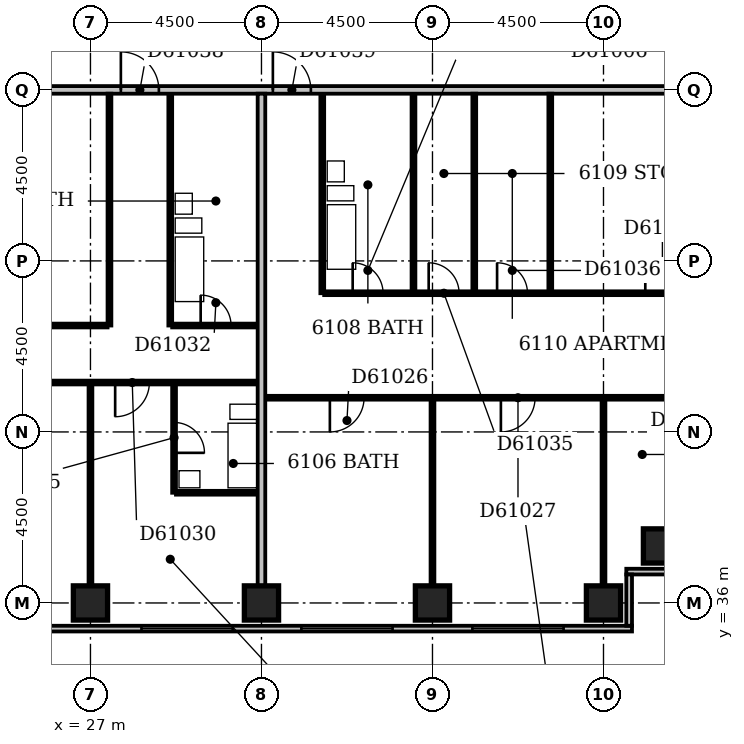
"""IFC4 building model, lengths in metres.
Left out: names, types, materials, properties, quantities, classifications, styles, units other than length and angle.
Written with IfcOpenShell. Run it as: python <this file> out.ifc"""

import sys

from ifc_helpers import new_model, si_unit, direction, frame, frame_2d, origin, origin_2d, place, context, subcontext, project, spatial, rectangle, extrude, element, fill, save


model = new_model("IFC4")
c1 = context("Model", 3, precision=1e-05, world=origin(), true_north=direction((0.0, 1.0)))
c2 = subcontext(c1, "Body", "Model", "MODEL_VIEW")
j1 = project(units=[si_unit("LENGTHUNIT", "METRE"), si_unit("PLANEANGLEUNIT", "RADIAN")], contexts=[c1])
p1 = place(None, origin())
s1 = spatial("IfcSite", under=j1, at=p1, CompositionType="ELEMENT")
p2 = place(p1, origin())
s2 = spatial("IfcBuilding", under=s1, at=p2, CompositionType="ELEMENT")
p3 = place(p2, frame((0.0, 0.0, 236.6)))
s3 = spatial("IfcBuildingStorey", under=s2, at=p3, CompositionType="ELEMENT", Elevation=236.6)
for number, where, z_axis, x_axis in (
    (1, (27.0, 36.0, -0.3), (0.0, 0.0, 1.0), (1.0, 0.0, 0.0)),
    (2, (31.5, 36.0, -0.3), (0.0, 0.0, 1.0), (1.0, 0.0, 0.0)),
    (3, (36.0, 36.0, -0.3), (0.0, 0.0, 1.0), (1.0, 0.0, 0.0)),
    (4, (40.5, 36.0, -0.3), (0.0, 0.0, 1.0), (1.0, 0.0, 0.0)),
    (5, (42.0, 37.5, -0.3), (0.0, 0.0, 1.0), (1.0, 0.0, 0.0)),
):
    element("IfcColumn", number, at=place(p3, frame(where, z_axis=z_axis, x_axis=x_axis)), inside=s3, PredefinedType="COLUMN", context=c2, shape_type="SweptSolid", body=[
        extrude(rectangle(XDim=0.9, YDim=0.9, at=origin_2d()), origin(), (0.0, 0.0, 1.0), 3.6),
    ])
p4 = place(p3, frame((23.1, 35.325, 0.0), z_axis=(0.0, 0.0, 1.0), x_axis=(1.0, 0.0, 0.0)))
e6 = element("IfcWall", 6, at=p4, inside=s3, PredefinedType="STANDARD", context=c2, shape_type="SweptSolid", body=[
    extrude(rectangle(XDim=18.15, YDim=0.15, at=frame_2d((9.075, 0.0))), origin(), (0.0, 0.0, 1.0), 2.7),
])
p5 = place(p4, frame((0.45, 0.0, 0.6)))
e7 = element("IfcOpeningElement", 7, at=p5, cuts=e6, PredefinedType="OPENING", context=c2, shape_type="SweptSolid", body=[
    extrude(rectangle(XDim=2.4, YDim=1.8, at=frame_2d((1.2, 0.9))), frame((0.0, 0.087, 0.0), z_axis=(0.0, -1.0, 0.0), x_axis=(1.0, 0.0, 0.0)), (0.0, 0.0, 1.0), 0.174),
])
p6 = place(p4, frame((5.242, 0.0, 0.6)))
e8 = element("IfcOpeningElement", 8, at=p6, cuts=e6, PredefinedType="OPENING", context=c2, shape_type="SweptSolid", body=[
    extrude(rectangle(XDim=2.4, YDim=1.8, at=frame_2d((1.2, 0.9))), frame((0.0, 0.087, 0.0), z_axis=(0.0, -1.0, 0.0), x_axis=(1.0, 0.0, 0.0)), (0.0, 0.0, 1.0), 0.174),
])
p7 = place(p4, frame((9.45, 0.0, 0.6)))
e9 = element("IfcOpeningElement", 9, at=p7, cuts=e6, PredefinedType="OPENING", context=c2, shape_type="SweptSolid", body=[
    extrude(rectangle(XDim=2.4, YDim=1.8, at=frame_2d((1.2, 0.9))), frame((0.0, 0.087, 0.0), z_axis=(0.0, -1.0, 0.0), x_axis=(1.0, 0.0, 0.0)), (0.0, 0.0, 1.0), 0.174),
])
p8 = place(p4, frame((13.95, 0.0, 0.6)))
e10 = element("IfcOpeningElement", 10, at=p8, cuts=e6, PredefinedType="OPENING", context=c2, shape_type="SweptSolid", body=[
    extrude(rectangle(XDim=2.4, YDim=1.8, at=frame_2d((1.2, 0.9))), frame((0.0, 0.087, 0.0), z_axis=(0.0, -1.0, 0.0), x_axis=(1.0, 0.0, 0.0)), (0.0, 0.0, 1.0), 0.174),
])
p9 = place(p3, frame((41.175, 35.4, 0.0), z_axis=(0.0, 0.0, 1.0), x_axis=(0.0, 1.0, 0.0)))
e11 = element("IfcWall", 11, at=p9, inside=s3, PredefinedType="STANDARD", context=c2, shape_type="SweptSolid", body=[
    extrude(rectangle(XDim=1.35, YDim=0.15, at=frame_2d((0.675, 0.0))), origin(), (0.0, 0.0, 1.0), 2.7),
])
p10 = place(p3, frame((41.1, 36.825, 0.0), z_axis=(0.0, 0.0, 1.0), x_axis=(1.0, 0.0, 0.0)))
e12 = element("IfcWall", 12, at=p10, inside=s3, PredefinedType="STANDARD", context=c2, shape_type="SweptSolid", body=[
    extrude(rectangle(XDim=1.65, YDim=0.15, at=frame_2d((0.825, 0.0))), origin(), (0.0, 0.0, 1.0), 2.7),
])
p11 = place(p3, frame((27.0, 36.45, 0.0), z_axis=(0.0, 0.0, 1.0), x_axis=(0.0, 1.0, 0.0)))
e13 = element("IfcWall", 13, at=p11, inside=s3, PredefinedType="PARTITIONING", context=c2, shape_type="SweptSolid", body=[
    extrude(rectangle(XDim=5.3, YDim=0.1, at=frame_2d((2.65, 0.0))), origin(), (0.0, 0.0, 1.0), 3.3),
])
p12 = place(p3, frame((31.5, 36.45, 0.0), z_axis=(0.0, 0.0, 1.0), x_axis=(0.0, 1.0, 0.0)))
e14 = element("IfcWall", 14, at=p12, inside=s3, PredefinedType="PARTITIONING", context=c2, shape_type="SweptSolid", body=[
    extrude(rectangle(XDim=12.95, YDim=0.2, at=frame_2d((6.475, 0.0))), origin(), (0.0, 0.0, 1.0), 3.3),
])
for number, where, z_axis, x_axis in (
    (15, (36.0, 36.45, 0.0), (0.0, 0.0, 1.0), (0.0, 1.0, 0.0)),
    (16, (40.5, 36.45, 0.0), (0.0, 0.0, 1.0), (0.0, 1.0, 0.0)),
):
    element("IfcWall", number, at=place(p3, frame(where, z_axis=z_axis, x_axis=x_axis)), inside=s3, PredefinedType="PARTITIONING", context=c2, shape_type="SweptSolid", body=[
        extrude(rectangle(XDim=4.9, YDim=0.1, at=frame_2d((2.45, 0.0))), origin(), (0.0, 0.0, 1.0), 3.3),
    ])
p13 = place(p3, frame((29.2, 38.9, 0.0), z_axis=(0.0, 0.0, 1.0), x_axis=(0.0, 1.0, 0.0)))
e17 = element("IfcWall", 17, at=p13, inside=s3, PredefinedType="PLUMBINGWALL", context=c2, shape_type="SweptSolid", body=[
    extrude(rectangle(XDim=2.85, YDim=0.1, at=frame_2d((1.425, 0.0))), origin(), (0.0, 0.0, 1.0), 3.3),
])
p14 = place(p13, frame((1.05, 0.0, 0.0)))
e18 = element("IfcOpeningElement", 18, at=p14, cuts=e17, PredefinedType="OPENING", context=c2, shape_type="SweptSolid", body=[
    extrude(rectangle(XDim=0.8, YDim=2.1, at=frame_2d((0.4, 1.05))), frame((0.0, 0.062, 0.0), z_axis=(0.0, -1.0, 0.0), x_axis=(1.0, 0.0, 0.0)), (0.0, 0.0, 1.0), 0.124),
])
p15 = place(p3, frame((29.25, 38.9, 0.0), z_axis=(0.0, 0.0, 1.0), x_axis=(1.0, 0.0, 0.0)))
e19 = element("IfcWall", 19, at=p15, inside=s3, PredefinedType="PLUMBINGWALL", context=c2, shape_type="SweptSolid", body=[
    extrude(rectangle(XDim=2.15, YDim=0.1, at=frame_2d((1.075, 0.0))), origin(), (0.0, 0.0, 1.0), 3.3),
])
p16 = place(p3, frame((31.6, 41.4, 0.0), z_axis=(0.0, 0.0, 1.0), x_axis=(1.0, 0.0, 0.0)))
e20 = element("IfcWall", 20, at=p16, inside=s3, PredefinedType="PARTITIONING", context=c2, shape_type="SweptSolid", body=[
    extrude(rectangle(XDim=14.0, YDim=0.1, at=frame_2d((7.0, 0.0))), origin(), (0.0, 0.0, 1.0), 3.3),
])
p17 = place(p16, frame((1.7, 0.0, 0.0)))
e21 = element("IfcOpeningElement", 21, at=p17, cuts=e20, PredefinedType="OPENING", context=c2, shape_type="SweptSolid", body=[
    extrude(rectangle(XDim=0.9, YDim=2.1, at=frame_2d((0.45, 1.05))), frame((0.0, 0.062, 0.0), z_axis=(0.0, -1.0, 0.0), x_axis=(1.0, 0.0, 0.0)), (0.0, 0.0, 1.0), 0.124),
])
p18 = place(p16, frame((6.2, 0.0, 0.0)))
e22 = element("IfcOpeningElement", 22, at=p18, cuts=e20, PredefinedType="OPENING", context=c2, shape_type="SweptSolid", body=[
    extrude(rectangle(XDim=0.9, YDim=2.1, at=frame_2d((0.45, 1.05))), frame((0.0, 0.062, 0.0), z_axis=(0.0, -1.0, 0.0), x_axis=(1.0, 0.0, 0.0)), (0.0, 0.0, 1.0), 0.124),
])
p19 = place(p16, frame((10.7, 0.0, 0.0)))
e23 = element("IfcOpeningElement", 23, at=p19, cuts=e20, PredefinedType="OPENING", context=c2, shape_type="SweptSolid", body=[
    extrude(rectangle(XDim=0.9, YDim=2.1, at=frame_2d((0.45, 1.05))), frame((0.0, 0.062, 0.0), z_axis=(0.0, -1.0, 0.0), x_axis=(1.0, 0.0, 0.0)), (0.0, 0.0, 1.0), 0.124),
])
p20 = place(p3, frame((22.6, 41.8, 0.0), z_axis=(0.0, 0.0, 1.0), x_axis=(1.0, 0.0, 0.0)))
e24 = element("IfcWall", 24, at=p20, inside=s3, PredefinedType="PARTITIONING", context=c2, shape_type="SweptSolid", body=[
    extrude(rectangle(XDim=8.8, YDim=0.1, at=frame_2d((4.4, 0.0))), origin(), (0.0, 0.0, 1.0), 3.3),
])
p21 = place(p20, frame((1.7, 0.0, 0.0)))
e25 = element("IfcOpeningElement", 25, at=p21, cuts=e24, PredefinedType="OPENING", context=c2, shape_type="SweptSolid", body=[
    extrude(rectangle(XDim=0.9, YDim=2.1, at=frame_2d((0.45, 1.05))), frame((0.0, 0.062, 0.0), z_axis=(0.0, -1.0, 0.0), x_axis=(1.0, 0.0, 0.0)), (0.0, 0.0, 1.0), 0.124),
])
p22 = place(p20, frame((5.05, 0.0, 0.0)))
e26 = element("IfcOpeningElement", 26, at=p22, cuts=e24, PredefinedType="OPENING", context=c2, shape_type="SweptSolid", body=[
    extrude(rectangle(XDim=0.9, YDim=2.1, at=frame_2d((0.45, 1.05))), frame((0.0, 0.062, 0.0), z_axis=(0.0, -1.0, 0.0), x_axis=(1.0, 0.0, 0.0)), (0.0, 0.0, 1.0), 0.124),
])
p23 = place(p3, frame((22.6, 43.3, 0.0), z_axis=(0.0, 0.0, 1.0), x_axis=(1.0, 0.0, 0.0)))
e27 = element("IfcWall", 27, at=p23, inside=s3, PredefinedType="PARTITIONING", context=c2, shape_type="SweptSolid", body=[
    extrude(rectangle(XDim=4.85, YDim=0.1, at=frame_2d((2.425, 0.0))), origin(), (0.0, 0.0, 1.0), 3.3),
])
p24 = place(p23, frame((1.95, 0.0, 0.0)))
e28 = element("IfcOpeningElement", 28, at=p24, cuts=e27, PredefinedType="OPENING", context=c2, shape_type="SweptSolid", body=[
    extrude(rectangle(XDim=0.9, YDim=2.1, at=frame_2d((0.45, 1.05))), frame((0.0, 0.062, 0.0), z_axis=(0.0, -1.0, 0.0), x_axis=(1.0, 0.0, 0.0)), (0.0, 0.0, 1.0), 0.124),
])
p25 = place(p3, frame((27.5, 43.3, 0.0), z_axis=(0.0, 0.0, 1.0), x_axis=(0.0, 1.0, 0.0)))
e29 = element("IfcWall", 29, at=p25, inside=s3, PredefinedType="PARTITIONING", context=c2, shape_type="SweptSolid", body=[
    extrude(rectangle(XDim=6.1, YDim=0.1, at=frame_2d((3.05, 0.0))), origin(), (0.0, 0.0, 1.0), 3.3),
])
p26 = place(p3, frame((29.1, 43.3, 0.0), z_axis=(0.0, 0.0, 1.0), x_axis=(0.0, 1.0, 0.0)))
e30 = element("IfcWall", 30, at=p26, inside=s3, PredefinedType="PLUMBINGWALL", context=c2, shape_type="SweptSolid", body=[
    extrude(rectangle(XDim=6.1, YDim=0.1, at=frame_2d((3.05, 0.0))), origin(), (0.0, 0.0, 1.0), 3.3),
])
p27 = place(p3, frame((29.15, 43.3, 0.0), z_axis=(0.0, 0.0, 1.0), x_axis=(1.0, 0.0, 0.0)))
e31 = element("IfcWall", 31, at=p27, inside=s3, PredefinedType="PARTITIONING", context=c2, shape_type="SweptSolid", body=[
    extrude(rectangle(XDim=2.25, YDim=0.1, at=frame_2d((1.125, 0.0))), origin(), (0.0, 0.0, 1.0), 3.3),
])
p28 = place(p27, frame((0.75, 0.0, 0.0)))
e32 = element("IfcOpeningElement", 32, at=p28, cuts=e31, PredefinedType="OPENING", context=c2, shape_type="SweptSolid", body=[
    extrude(rectangle(XDim=0.8, YDim=2.1, at=frame_2d((0.4, 1.05))), frame((0.0, 0.062, 0.0), z_axis=(0.0, -1.0, 0.0), x_axis=(1.0, 0.0, 0.0)), (0.0, 0.0, 1.0), 0.124),
])
p29 = place(p3, frame((33.1, 44.15, 0.0), z_axis=(0.0, 0.0, 1.0), x_axis=(0.0, 1.0, 0.0)))
e33 = element("IfcWall", 33, at=p29, inside=s3, PredefinedType="PLUMBINGWALL", context=c2, shape_type="SweptSolid", body=[
    extrude(rectangle(XDim=5.25, YDim=0.1, at=frame_2d((2.625, 0.0))), origin(), (0.0, 0.0, 1.0), 3.3),
])
p30 = place(p3, frame((33.15, 44.15, 0.0), z_axis=(0.0, 0.0, 1.0), x_axis=(1.0, 0.0, 0.0)))
e34 = element("IfcWall", 34, at=p30, inside=s3, PredefinedType="PARTITIONING", context=c2, shape_type="SweptSolid", body=[
    extrude(rectangle(XDim=12.45, YDim=0.1, at=frame_2d((6.225, 0.0))), origin(), (0.0, 0.0, 1.0), 3.3),
])
p31 = place(p30, frame((0.75, 0.0, 0.0)))
e35 = element("IfcOpeningElement", 35, at=p31, cuts=e34, PredefinedType="OPENING", context=c2, shape_type="SweptSolid", body=[
    extrude(rectangle(XDim=0.8, YDim=2.1, at=frame_2d((0.4, 1.05))), frame((0.0, 0.062, 0.0), z_axis=(0.0, -1.0, 0.0), x_axis=(1.0, 0.0, 0.0)), (0.0, 0.0, 1.0), 0.124),
])
p32 = place(p30, frame((8.45, 0.0, 0.0)))
e36 = element("IfcOpeningElement", 36, at=p32, cuts=e34, PredefinedType="OPENING", context=c2, shape_type="SweptSolid", body=[
    extrude(rectangle(XDim=0.9, YDim=2.1, at=frame_2d((0.45, 1.05))), frame((0.0, 0.062, 0.0), z_axis=(0.0, -1.0, 0.0), x_axis=(1.0, 0.0, 0.0)), (0.0, 0.0, 1.0), 0.124),
])
p33 = place(p30, frame((2.75, 0.0, 0.0)))
e37 = element("IfcOpeningElement", 37, at=p33, cuts=e34, PredefinedType="OPENING", context=c2, shape_type="SweptSolid", body=[
    extrude(rectangle(XDim=0.8, YDim=2.1, at=frame_2d((0.4, 1.05))), frame((0.0, 0.062, 0.0), z_axis=(0.0, -1.0, 0.0), x_axis=(1.0, 0.0, 0.0)), (0.0, 0.0, 1.0), 0.124),
])
p34 = place(p30, frame((4.55, 0.0, 0.0)))
e38 = element("IfcOpeningElement", 38, at=p34, cuts=e34, PredefinedType="OPENING", context=c2, shape_type="SweptSolid", body=[
    extrude(rectangle(XDim=0.8, YDim=2.1, at=frame_2d((0.4, 1.05))), frame((0.0, 0.062, 0.0), z_axis=(0.0, -1.0, 0.0), x_axis=(1.0, 0.0, 0.0)), (0.0, 0.0, 1.0), 0.124),
])
p35 = place(p3, frame((35.5, 44.2, 0.0), z_axis=(0.0, 0.0, 1.0), x_axis=(0.0, 1.0, 0.0)))
e39 = element("IfcWall", 39, at=p35, inside=s3, PredefinedType="PLUMBINGWALL", context=c2, shape_type="SweptSolid", body=[
    extrude(rectangle(XDim=5.2, YDim=0.1, at=frame_2d((2.6, 0.0))), origin(), (0.0, 0.0, 1.0), 3.3),
])
for number, where, z_axis, x_axis in (
    (40, (37.1, 44.2, 0.0), (0.0, 0.0, 1.0), (0.0, 1.0, 0.0)),
    (41, (39.1, 44.2, 0.0), (0.0, 0.0, 1.0), (0.0, 1.0, 0.0)),
):
    element("IfcWall", number, at=place(p3, frame(where, z_axis=z_axis, x_axis=x_axis)), inside=s3, PredefinedType="PARTITIONING", context=c2, shape_type="SweptSolid", body=[
        extrude(rectangle(XDim=5.2, YDim=0.1, at=frame_2d((2.6, 0.0))), origin(), (0.0, 0.0, 1.0), 3.3),
    ])
p36 = place(p3, frame((22.6, 49.5, 0.0), z_axis=(0.0, 0.0, 1.0), x_axis=(1.0, 0.0, 0.0)))
e42 = element("IfcWall", 42, at=p36, inside=s3, PredefinedType="PARTITIONING", context=c2, shape_type="SweptSolid", body=[
    extrude(rectangle(XDim=21.95, YDim=0.2, at=frame_2d((10.975, 0.0))), origin(), (0.0, 0.0, 1.0), 3.3),
])
p37 = place(p36, frame((5.2, 0.0, 0.0)))
e43 = element("IfcOpeningElement", 43, at=p37, cuts=e42, PredefinedType="OPENING", context=c2, shape_type="SweptSolid", body=[
    extrude(rectangle(XDim=1.0, YDim=2.1, at=frame_2d((0.5, 1.05))), frame((0.0, 0.112, 0.0), z_axis=(0.0, -1.0, 0.0), x_axis=(1.0, 0.0, 0.0)), (0.0, 0.0, 1.0), 0.224),
])
p38 = place(p36, frame((9.2, 0.0, 0.0)))
e44 = element("IfcOpeningElement", 44, at=p38, cuts=e42, PredefinedType="OPENING", context=c2, shape_type="SweptSolid", body=[
    extrude(rectangle(XDim=1.0, YDim=2.1, at=frame_2d((0.5, 1.05))), frame((0.0, 0.112, 0.0), z_axis=(0.0, -1.0, 0.0), x_axis=(1.0, 0.0, 0.0)), (0.0, 0.0, 1.0), 0.224),
])
p39 = place(p6, origin())
e45 = element("IfcWindow", 45, at=p39, inside=s3, PartitioningType="SINGLE_PANEL", PredefinedType="WINDOW", context=c2, shape_type="SweptSolid", body=[
    extrude(rectangle(XDim=2.4, YDim=1.8, at=frame_2d((1.2, 0.9))), frame((0.0, 0.03, 0.0), z_axis=(0.0, -1.0, 0.0), x_axis=(1.0, 0.0, 0.0)), (0.0, 0.0, 1.0), 0.06),
])
fill(e8, e45)
p40 = place(p7, origin())
e46 = element("IfcWindow", 46, at=p40, inside=s3, PartitioningType="SINGLE_PANEL", PredefinedType="WINDOW", context=c2, shape_type="SweptSolid", body=[
    extrude(rectangle(XDim=2.4, YDim=1.8, at=frame_2d((1.2, 0.9))), frame((0.0, 0.03, 0.0), z_axis=(0.0, -1.0, 0.0), x_axis=(1.0, 0.0, 0.0)), (0.0, 0.0, 1.0), 0.06),
])
fill(e9, e46)
p41 = place(p8, origin())
e47 = element("IfcWindow", 47, at=p41, inside=s3, PartitioningType="SINGLE_PANEL", PredefinedType="WINDOW", context=c2, shape_type="SweptSolid", body=[
    extrude(rectangle(XDim=2.4, YDim=1.8, at=frame_2d((1.2, 0.9))), frame((0.0, 0.03, 0.0), z_axis=(0.0, -1.0, 0.0), x_axis=(1.0, 0.0, 0.0)), (0.0, 0.0, 1.0), 0.06),
])
fill(e10, e47)
p42 = place(p14, frame((0.8, 0.0, 0.0), z_axis=(0.0, 0.0, 1.0), x_axis=(-1.0, 0.0, 0.0)))
e48 = element("IfcDoor", 48, at=p42, inside=s3, OperationType="SINGLE_SWING_RIGHT", PredefinedType="DOOR", context=c2, shape_type="SweptSolid", body=[
    extrude(rectangle(XDim=0.8, YDim=2.1, at=frame_2d((0.4, 1.05))), frame((0.0, 0.025, 0.0), z_axis=(0.0, -1.0, 0.0), x_axis=(1.0, 0.0, 0.0)), (0.0, 0.0, 1.0), 0.05),
])
fill(e18, e48)
p43 = place(p17, frame((0.9, 0.0, 0.0), z_axis=(0.0, 0.0, 1.0), x_axis=(-1.0, 0.0, 0.0)))
e49 = element("IfcDoor", 49, at=p43, inside=s3, OperationType="SINGLE_SWING_RIGHT", PredefinedType="DOOR", context=c2, shape_type="SweptSolid", body=[
    extrude(rectangle(XDim=0.9, YDim=2.1, at=frame_2d((0.45, 1.05))), frame((0.0, 0.025, 0.0), z_axis=(0.0, -1.0, 0.0), x_axis=(1.0, 0.0, 0.0)), (0.0, 0.0, 1.0), 0.05),
])
fill(e21, e49)
p44 = place(p18, frame((0.9, 0.0, 0.0), z_axis=(0.0, 0.0, 1.0), x_axis=(-1.0, 0.0, 0.0)))
e50 = element("IfcDoor", 50, at=p44, inside=s3, OperationType="SINGLE_SWING_RIGHT", PredefinedType="DOOR", context=c2, shape_type="SweptSolid", body=[
    extrude(rectangle(XDim=0.9, YDim=2.1, at=frame_2d((0.45, 1.05))), frame((0.0, 0.025, 0.0), z_axis=(0.0, -1.0, 0.0), x_axis=(1.0, 0.0, 0.0)), (0.0, 0.0, 1.0), 0.05),
])
fill(e22, e50)
p45 = place(p22, frame((0.9, 0.0, 0.0), z_axis=(0.0, 0.0, 1.0), x_axis=(-1.0, 0.0, 0.0)))
e51 = element("IfcDoor", 51, at=p45, inside=s3, OperationType="SINGLE_SWING_RIGHT", PredefinedType="DOOR", context=c2, shape_type="SweptSolid", body=[
    extrude(rectangle(XDim=0.9, YDim=2.1, at=frame_2d((0.45, 1.05))), frame((0.0, 0.025, 0.0), z_axis=(0.0, -1.0, 0.0), x_axis=(1.0, 0.0, 0.0)), (0.0, 0.0, 1.0), 0.05),
])
fill(e26, e51)
p46 = place(p28, origin())
e52 = element("IfcDoor", 52, at=p46, inside=s3, OperationType="SINGLE_SWING_LEFT", PredefinedType="DOOR", context=c2, shape_type="SweptSolid", body=[
    extrude(rectangle(XDim=0.8, YDim=2.1, at=frame_2d((0.4, 1.05))), frame((0.0, 0.025, 0.0), z_axis=(0.0, -1.0, 0.0), x_axis=(1.0, 0.0, 0.0)), (0.0, 0.0, 1.0), 0.05),
])
fill(e32, e52)
p47 = place(p31, origin())
e53 = element("IfcDoor", 53, at=p47, inside=s3, OperationType="SINGLE_SWING_LEFT", PredefinedType="DOOR", context=c2, shape_type="SweptSolid", body=[
    extrude(rectangle(XDim=0.8, YDim=2.1, at=frame_2d((0.4, 1.05))), frame((0.0, 0.025, 0.0), z_axis=(0.0, -1.0, 0.0), x_axis=(1.0, 0.0, 0.0)), (0.0, 0.0, 1.0), 0.05),
])
fill(e35, e53)
p48 = place(p32, origin())
e54 = element("IfcDoor", 54, at=p48, inside=s3, OperationType="SINGLE_SWING_LEFT", PredefinedType="DOOR", context=c2, shape_type="SweptSolid", body=[
    extrude(rectangle(XDim=0.9, YDim=2.1, at=frame_2d((0.45, 1.05))), frame((0.0, 0.025, 0.0), z_axis=(0.0, -1.0, 0.0), x_axis=(1.0, 0.0, 0.0)), (0.0, 0.0, 1.0), 0.05),
])
fill(e36, e54)
p49 = place(p33, origin())
e55 = element("IfcDoor", 55, at=p49, inside=s3, OperationType="SINGLE_SWING_LEFT", PredefinedType="DOOR", context=c2, shape_type="SweptSolid", body=[
    extrude(rectangle(XDim=0.8, YDim=2.1, at=frame_2d((0.4, 1.05))), frame((0.0, 0.025, 0.0), z_axis=(0.0, -1.0, 0.0), x_axis=(1.0, 0.0, 0.0)), (0.0, 0.0, 1.0), 0.05),
])
fill(e37, e55)
p50 = place(p34, origin())
e56 = element("IfcDoor", 56, at=p50, inside=s3, OperationType="SINGLE_SWING_LEFT", PredefinedType="DOOR", context=c2, shape_type="SweptSolid", body=[
    extrude(rectangle(XDim=0.8, YDim=2.1, at=frame_2d((0.4, 1.05))), frame((0.0, 0.025, 0.0), z_axis=(0.0, -1.0, 0.0), x_axis=(1.0, 0.0, 0.0)), (0.0, 0.0, 1.0), 0.05),
])
fill(e38, e56)
p51 = place(p37, origin())
e57 = element("IfcDoor", 57, at=p51, inside=s3, OperationType="SINGLE_SWING_LEFT", PredefinedType="DOOR", context=c2, shape_type="SweptSolid", body=[
    extrude(rectangle(XDim=1.0, YDim=2.1, at=frame_2d((0.5, 1.05))), frame((0.0, 0.025, 0.0), z_axis=(0.0, -1.0, 0.0), x_axis=(1.0, 0.0, 0.0)), (0.0, 0.0, 1.0), 0.05),
])
fill(e43, e57)
p52 = place(p38, origin())
e58 = element("IfcDoor", 58, at=p52, inside=s3, OperationType="SINGLE_SWING_LEFT", PredefinedType="DOOR", context=c2, shape_type="SweptSolid", body=[
    extrude(rectangle(XDim=1.0, YDim=2.1, at=frame_2d((0.5, 1.05))), frame((0.0, 0.025, 0.0), z_axis=(0.0, -1.0, 0.0), x_axis=(1.0, 0.0, 0.0)), (0.0, 0.0, 1.0), 0.05),
])
fill(e44, e58)
save(model, sys.argv[1])
